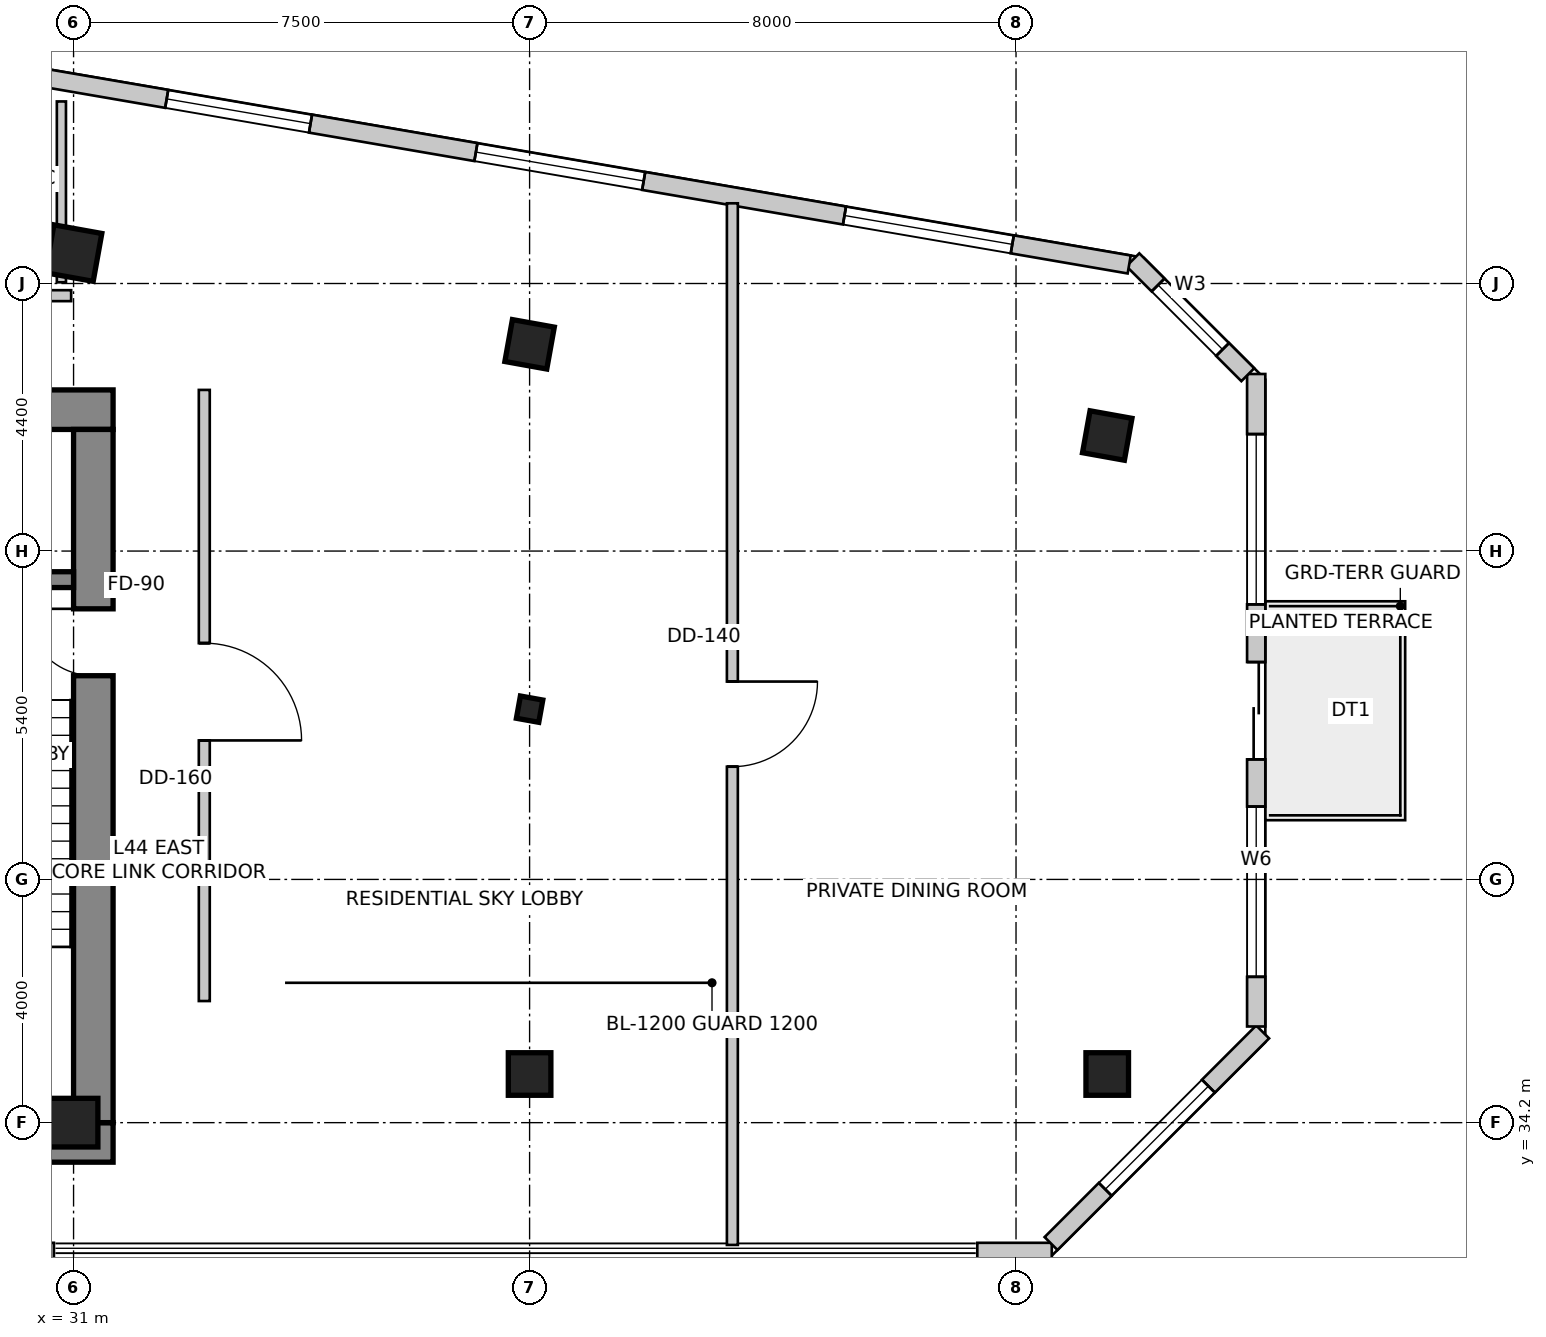
"""IFC4 building model, lengths in metres.
Left out: names, types, materials, properties, quantities, classifications, styles, units other than length and angle.
Written with IfcOpenShell. Run it as: python <this file> out.ifc"""

import sys

from ifc_helpers import new_model, si_unit, direction, frame, frame_2d, origin, origin_2d, place, context, subcontext, project, spatial, rectangle, i_section, extrude, source, transform, mapped, element, fill, save


model = new_model("IFC4")
c1 = context("Model", 3, precision=1e-05, world=origin(), true_north=direction((0.0, 1.0)))
c2 = subcontext(c1, "Body", "Model", "MODEL_VIEW")
j1 = project(units=[si_unit("LENGTHUNIT", "METRE"), si_unit("PLANEANGLEUNIT", "RADIAN")], contexts=[c1])
p1 = place(None, origin())
s1 = spatial("IfcSite", under=j1, at=p1, CompositionType="ELEMENT")
p2 = place(p1, origin())
s2 = spatial("IfcBuilding", under=s1, at=p2, CompositionType="ELEMENT")
p3 = place(p2, frame((0.0, 0.0, 178.2)))
s3 = spatial("IfcBuildingStorey", under=s2, at=p3, CompositionType="ELEMENT", Elevation=178.2)
p4 = place(p3, frame((15.95, 45.925, 0.0), z_axis=(0.0, 0.0, 1.0), x_axis=(1.0, 0.0, 0.0)))
e1 = element("IfcWall", 1, at=p4, inside=s3, PredefinedType="SHEAR", context=c2, shape_type="SweptSolid", body=[
    extrude(rectangle(XDim=15.7, YDim=0.65, at=frame_2d((7.85, 0.0))), origin(), (0.0, 0.0, 1.0), 5.2),
])
p5 = place(p3, frame((15.95, 33.875, 0.0), z_axis=(0.0, 0.0, 1.0), x_axis=(1.0, 0.0, 0.0)))
e2 = element("IfcWall", 2, at=p5, inside=s3, PredefinedType="SHEAR", context=c2, shape_type="SweptSolid", body=[
    extrude(rectangle(XDim=15.7, YDim=0.65, at=frame_2d((7.85, 0.0))), origin(), (0.0, 0.0, 1.0), 5.2),
])
m1 = source(origin(), c2, "Body", "SweptSolid", [
    extrude(rectangle(XDim=1.1, YDim=2.15, at=frame_2d((0.55, 1.075))), frame((0.0, 0.335, 0.0), z_axis=(0.0, -1.0, 0.0), x_axis=(1.0, 0.0, 0.0)), (0.0, 0.0, 1.0), 0.67),
])
p6 = place(p5, frame((10.08, 0.0, 0.0)))
e3 = element("IfcOpeningElement", 3, at=p6, cuts=e2, PredefinedType="OPENING", context=c2, shape_type="MappedRepresentation", body=[
    mapped(m1, transform((0.0, 0.0, 0.0), scale=1.0)),
])
p7 = place(p3, frame((31.325, 34.2, 0.0), z_axis=(0.0, 0.0, 1.0), x_axis=(0.0, 1.0, 0.0)))
e4 = element("IfcWall", 4, at=p7, inside=s3, PredefinedType="SHEAR", context=c2, shape_type="SweptSolid", body=[
    extrude(rectangle(XDim=11.4, YDim=0.65, at=frame_2d((5.7, 0.0))), origin(), (0.0, 0.0, 1.0), 5.2),
])
p8 = place(p7, frame((7.35, 0.0, 0.0)))
e5 = element("IfcOpeningElement", 5, at=p8, cuts=e4, PredefinedType="OPENING", context=c2, shape_type="MappedRepresentation", body=[
    mapped(m1, transform((0.0, 0.0, 0.0), scale=1.0)),
])
p9 = place(p3, frame((27.5, 43.13, 0.0), z_axis=(0.0, 0.0, 1.0), x_axis=(1.0, 0.0, 0.0)))
e6 = element("IfcWall", 6, at=p9, inside=s3, PredefinedType="SHEAR", context=c2, shape_type="SweptSolid", body=[
    extrude(rectangle(XDim=3.5, YDim=0.26, at=frame_2d((1.75, 0.0))), origin(), (0.0, 0.0, 1.0), 5.2),
])
m2 = source(origin(), c2, "Body", "SweptSolid", [
    extrude(rectangle(XDim=0.8, YDim=0.8, at=origin_2d()), origin(), (0.0, 0.0, 1.0), 5.2),
])
p10 = place(p3, frame((31.0, 48.5, 0.0), z_axis=(0.0, 0.0, 1.0), x_axis=(0.984195607969, -0.17708474032, 0.0)))
e7 = element("IfcColumn", 7, at=p10, inside=s3, PredefinedType="COLUMN", context=c2, shape_type="MappedRepresentation", body=[
    mapped(m2, transform((0.0, 0.0, 0.0), scale=1.0)),
])
m3 = source(origin(), c2, "Body", "SweptSolid", [
    extrude(rectangle(XDim=0.7, YDim=0.7, at=origin_2d()), origin(), (0.0, 0.0, 1.0), 5.2),
])
for number, where, z_axis, x_axis in (
    (8, (38.5, 47.0, 0.0), (0.0, 0.0, 1.0), (0.984, -0.177, 0.0)),
    (9, (48.0, 45.5, 0.0), (0.0, 0.0, 1.0), (0.984, -0.177, 0.0)),
):
    element("IfcColumn", number, at=place(p3, frame(where, z_axis=z_axis, x_axis=x_axis)), inside=s3, PredefinedType="COLUMN", context=c2, shape_type="MappedRepresentation", body=[
        mapped(m3, transform((0.0, 0.0, 0.0), scale=1.0)),
    ])
p11 = place(p3, frame((31.0, 34.2, 0.0), z_axis=(0.0, 0.0, 1.0), x_axis=(1.0, 0.0, 0.0)))
e10 = element("IfcColumn", 10, at=p11, inside=s3, PredefinedType="COLUMN", context=c2, shape_type="MappedRepresentation", body=[
    mapped(m2, transform((0.0, 0.0, 0.0), scale=1.0)),
])
for number, where, z_axis, x_axis in (
    (11, (38.5, 35.0, 0.0), (0.0, 0.0, 1.0), (1.0, 0.0, 0.0)),
    (12, (48.0, 35.0, 0.0), (0.0, 0.0, 1.0), (1.0, 0.0, 0.0)),
):
    element("IfcColumn", number, at=place(p3, frame(where, z_axis=z_axis, x_axis=x_axis)), inside=s3, PredefinedType="COLUMN", context=c2, shape_type="MappedRepresentation", body=[
        mapped(m3, transform((0.0, 0.0, 0.0), scale=1.0)),
    ])
m4 = source(origin(), c2, "Body", "SweptSolid", [
    extrude(i_section(OverallWidth=0.374, OverallDepth=0.372, WebThickness=0.016, FlangeThickness=0.026, FilletRadius=0.015, at=origin_2d()), origin(), (0.0, 0.0, 1.0), 5.2),
])
p12 = place(p3, frame((38.5, 41.0, 0.0), z_axis=(0.0, 0.0, 1.0), x_axis=(0.984195607969, -0.17708474032, 0.0)))
e13 = element("IfcColumn", 13, at=p12, inside=s3, PredefinedType="COLUMN", context=c2, shape_type="MappedRepresentation", body=[
    mapped(m4, transform((0.0, 0.0, 0.0), scale=1.0)),
])
p13 = place(p3, frame((29.797, 32.074, 0.0), z_axis=(0.0, 0.0, 1.0), x_axis=(1.0, 0.0, 0.0)))
e14 = element("IfcWall", 14, at=p13, inside=s3, PredefinedType="SOLIDWALL", context=c2, shape_type="SweptSolid", body=[
    extrude(rectangle(XDim=0.88, YDim=0.3, at=frame_2d((0.44, 0.0))), origin(), (0.0, 0.0, 1.0), 4.95),
])
p14 = place(p3, frame((45.863, 32.074, 0.0), z_axis=(0.0, 0.0, 1.0), x_axis=(1.0, 0.0, 0.0)))
e15 = element("IfcWall", 15, at=p14, inside=s3, PredefinedType="SOLIDWALL", context=c2, shape_type="SweptSolid", body=[
    extrude(rectangle(XDim=1.225, YDim=0.3, at=frame_2d((0.613, 0.0))), origin(), (0.0, 0.0, 1.0), 4.95),
])
p15 = place(p3, frame((47.076, 32.212, 0.0), z_axis=(0.0, 0.0, 1.0), x_axis=(0.707106781187, 0.707106781187, 0.0)))
e16 = element("IfcWall", 16, at=p15, inside=s3, PredefinedType="SOLIDWALL", context=c2, shape_type="SweptSolid", body=[
    extrude(rectangle(XDim=4.922, YDim=0.3, at=frame_2d((2.461, 0.0))), origin(), (0.0, 0.0, 1.0), 4.95),
])
m5 = source(origin(), c2, "Body", "SweptSolid", [
    extrude(rectangle(XDim=2.4, YDim=2.2, at=frame_2d((1.2, 1.1))), frame((0.0, 0.16, 0.0), z_axis=(0.0, -1.0, 0.0), x_axis=(1.0, 0.0, 0.0)), (0.0, 0.0, 1.0), 0.32),
])
p16 = place(p15, frame((1.261, 0.0, 0.85)))
e17 = element("IfcOpeningElement", 17, at=p16, cuts=e16, PredefinedType="OPENING", context=c2, shape_type="MappedRepresentation", body=[
    mapped(m5, transform((0.0, 0.0, 0.0), scale=1.0)),
])
p17 = place(p3, frame((50.45, 35.781, 0.0), z_axis=(0.0, 0.0, 1.0), x_axis=(0.0, 1.0, 0.0)))
e18 = element("IfcWall", 18, at=p17, inside=s3, PredefinedType="SOLIDWALL", context=c2, shape_type="SweptSolid", body=[
    extrude(rectangle(XDim=10.731, YDim=0.3, at=frame_2d((5.365, 0.0))), origin(), (0.0, 0.0, 1.0), 4.95),
])
m6 = source(origin(), c2, "Body", "SweptSolid", [
    extrude(rectangle(XDim=1.6, YDim=2.15, at=frame_2d((0.8, 1.075))), frame((0.0, 0.16, 0.0), z_axis=(0.0, -1.0, 0.0), x_axis=(1.0, 0.0, 0.0)), (0.0, 0.0, 1.0), 0.32),
])
p18 = place(p17, frame((4.393, 0.0, 0.0)))
e19 = element("IfcOpeningElement", 19, at=p18, cuts=e18, PredefinedType="OPENING", context=c2, shape_type="MappedRepresentation", body=[
    mapped(m6, transform((0.0, 0.0, 0.0), scale=1.0)),
])
m7 = source(origin(), c2, "Body", "SweptSolid", [
    extrude(rectangle(XDim=2.8, YDim=2.4, at=frame_2d((1.4, 1.2))), frame((0.0, 0.16, 0.0), z_axis=(0.0, -1.0, 0.0), x_axis=(1.0, 0.0, 0.0)), (0.0, 0.0, 1.0), 0.32),
])
p19 = place(p17, frame((0.817, 0.0, 0.85)))
e20 = element("IfcOpeningElement", 20, at=p19, cuts=e18, PredefinedType="OPENING", context=c2, shape_type="MappedRepresentation", body=[
    mapped(m7, transform((0.0, 0.0, 0.0), scale=1.0)),
])
p20 = place(p17, frame((6.942, 0.0, 0.85)))
e21 = element("IfcOpeningElement", 21, at=p20, cuts=e18, PredefinedType="OPENING", context=c2, shape_type="MappedRepresentation", body=[
    mapped(m7, transform((0.0, 0.0, 0.0), scale=1.0)),
])
p21 = place(p3, frame((50.312, 46.5, 0.0), z_axis=(0.0, 0.0, 1.0), x_axis=(-0.707106781187, 0.707106781187, 0.0)))
e22 = element("IfcWall", 22, at=p21, inside=s3, PredefinedType="SOLIDWALL", context=c2, shape_type="SweptSolid", body=[
    extrude(rectangle(XDim=2.673, YDim=0.3, at=frame_2d((1.337, 0.0))), origin(), (0.0, 0.0, 1.0), 4.95),
])
m8 = source(origin(), c2, "Body", "SweptSolid", [
    extrude(rectangle(XDim=1.5, YDim=1.8, at=frame_2d((0.75, 0.9))), frame((0.0, 0.16, 0.0), z_axis=(0.0, -1.0, 0.0), x_axis=(1.0, 0.0, 0.0)), (0.0, 0.0, 1.0), 0.32),
])
p22 = place(p21, frame((0.587, 0.0, 0.85)))
e23 = element("IfcOpeningElement", 23, at=p22, cuts=e22, PredefinedType="OPENING", context=c2, shape_type="MappedRepresentation", body=[
    mapped(m8, transform((0.0, 0.0, 0.0), scale=1.0)),
])
p23 = place(p3, frame((48.361, 48.313, 0.0), z_axis=(0.0, 0.0, 1.0), x_axis=(-0.985523113069, 0.169541126597, 0.0)))
e24 = element("IfcWall", 24, at=p23, inside=s3, PredefinedType="SOLIDWALL", context=c2, shape_type="SweptSolid", body=[
    extrude(rectangle(XDim=26.866, YDim=0.3, at=frame_2d((13.433, 0.0))), origin(), (0.0, 0.0, 1.0), 4.95),
])
p24 = place(p23, frame((1.951, 0.0, 0.85)))
e25 = element("IfcOpeningElement", 25, at=p24, cuts=e24, PredefinedType="OPENING", context=c2, shape_type="MappedRepresentation", body=[
    mapped(m7, transform((0.0, 0.0, 0.0), scale=1.0)),
])
p25 = place(p23, frame((8.102, 0.0, 0.85)))
e26 = element("IfcOpeningElement", 26, at=p25, cuts=e24, PredefinedType="OPENING", context=c2, shape_type="MappedRepresentation", body=[
    mapped(m7, transform((0.0, 0.0, 0.0), scale=1.0)),
])
p26 = place(p23, frame((13.662, 0.0, 0.85)))
e27 = element("IfcOpeningElement", 27, at=p26, cuts=e24, PredefinedType="OPENING", context=c2, shape_type="MappedRepresentation", body=[
    mapped(m5, transform((0.0, 0.0, 0.0), scale=1.0)),
])
p27 = place(p23, frame((19.83, 0.0, 0.85)))
e28 = element("IfcOpeningElement", 28, at=p27, cuts=e24, PredefinedType="OPENING", context=c2, shape_type="MappedRepresentation", body=[
    mapped(m7, transform((0.0, 0.0, 0.0), scale=1.0)),
])
p28 = place(p23, frame((24.983, 0.0, 0.85)))
e29 = element("IfcOpeningElement", 29, at=p28, cuts=e24, PredefinedType="OPENING", context=c2, shape_type="MappedRepresentation", body=[
    mapped(m8, transform((0.0, 0.0, 0.0), scale=1.0)),
])
p29 = place(p3, frame((24.162, 47.8, 0.0), z_axis=(0.0, 0.0, 1.0), x_axis=(1.0, 0.0, 0.0)))
e30 = element("IfcWall", 30, at=p29, inside=s3, PredefinedType="PARTITIONING", context=c2, shape_type="SweptSolid", body=[
    extrude(rectangle(XDim=6.798, YDim=0.18, at=frame_2d((3.399, 0.0))), origin(), (0.0, 0.0, 1.0), 4.522),
])
m9 = source(origin(), c2, "Body", "SweptSolid", [
    extrude(rectangle(XDim=0.85, YDim=2.15, at=frame_2d((0.425, 1.075))), frame((0.0, 0.1, 0.0), z_axis=(0.0, -1.0, 0.0), x_axis=(1.0, 0.0, 0.0)), (0.0, 0.0, 1.0), 0.2),
])
p30 = place(p29, frame((2.974, 0.0, 0.0)))
e31 = element("IfcOpeningElement", 31, at=p30, cuts=e30, PredefinedType="OPENING", context=c2, shape_type="MappedRepresentation", body=[
    mapped(m9, transform((0.0, 0.0, 0.0), scale=1.0)),
])
p31 = place(p3, frame((33.15, 46.25, 0.0), z_axis=(0.0, 0.0, 1.0), x_axis=(0.0, -1.0, 0.0)))
e32 = element("IfcWall", 32, at=p31, inside=s3, PredefinedType="PARTITIONING", context=c2, shape_type="SweptSolid", body=[
    extrude(rectangle(XDim=10.05, YDim=0.18, at=frame_2d((5.025, 0.0))), origin(), (0.0, 0.0, 1.0), 4.522),
])
m10 = source(origin(), c2, "Body", "SweptSolid", [
    extrude(rectangle(XDim=1.6, YDim=2.15, at=frame_2d((0.8, 1.075))), frame((0.0, 0.1, 0.0), z_axis=(0.0, -1.0, 0.0), x_axis=(1.0, 0.0, 0.0)), (0.0, 0.0, 1.0), 0.2),
])
p32 = place(p31, frame((4.164, 0.0, 0.0)))
e33 = element("IfcOpeningElement", 33, at=p32, cuts=e32, PredefinedType="OPENING", context=c2, shape_type="MappedRepresentation", body=[
    mapped(m10, transform((0.0, 0.0, 0.0), scale=1.0)),
])
p33 = place(p3, frame((41.835, 49.319, 0.0), z_axis=(0.0, 0.0, 1.0), x_axis=(0.0, -1.0, 0.0)))
e34 = element("IfcWall", 34, at=p33, inside=s3, PredefinedType="PARTITIONING", context=c2, shape_type="SweptSolid", body=[
    extrude(rectangle(XDim=17.13, YDim=0.18, at=frame_2d((8.565, 0.0))), origin(), (0.0, 0.0, 1.0), 4.242),
])
m11 = source(origin(), c2, "Body", "SweptSolid", [
    extrude(rectangle(XDim=1.4, YDim=2.15, at=frame_2d((0.7, 1.075))), frame((0.0, 0.1, 0.0), z_axis=(0.0, -1.0, 0.0), x_axis=(1.0, 0.0, 0.0)), (0.0, 0.0, 1.0), 0.2),
])
p34 = place(p33, frame((7.865, 0.0, 0.0)))
e35 = element("IfcOpeningElement", 35, at=p34, cuts=e34, PredefinedType="OPENING", context=c2, shape_type="MappedRepresentation", body=[
    mapped(m11, transform((0.0, 0.0, 0.0), scale=1.0)),
])
p35 = place(p3, frame((30.8, 50.994, 0.0), z_axis=(0.0, 0.0, 1.0), x_axis=(0.0, -1.0, 0.0)))
e36 = element("IfcWall", 36, at=p35, inside=s3, PredefinedType="PARTITIONING", context=c2, shape_type="SweptSolid", body=[
    extrude(rectangle(XDim=2.974, YDim=0.15, at=frame_2d((1.487, 0.0))), origin(), (0.0, 0.0, 1.0), 4.242),
])
m12 = source(origin(), c2, "Body", "SweptSolid", [
    extrude(rectangle(XDim=2.4, YDim=2.2, at=frame_2d((1.2, 1.1))), frame((0.0, -0.015, 0.0), z_axis=(0.0, -1.0, 0.0), x_axis=(1.0, 0.0, 0.0)), (0.0, 0.0, 1.0), 0.06),
])
p36 = place(p16, origin())
e37 = element("IfcWindow", 37, at=p36, inside=s3, PartitioningType="SINGLE_PANEL", PredefinedType="WINDOW", context=c2, shape_type="MappedRepresentation", body=[
    mapped(m12, transform((0.0, 0.0, 0.0), scale=1.0)),
])
fill(e17, e37)
m13 = source(origin(), c2, "Body", "SweptSolid", [
    extrude(rectangle(XDim=1.6, YDim=2.15, at=frame_2d((0.8, 1.075))), frame((0.0, 0.025, 0.0), z_axis=(0.0, -1.0, 0.0), x_axis=(1.0, 0.0, 0.0)), (0.0, 0.0, 1.0), 0.05),
])
p37 = place(p18, origin())
e38 = element("IfcDoor", 38, at=p37, inside=s3, OperationType="DOUBLE_DOOR_SLIDING", PredefinedType="DOOR", context=c2, shape_type="MappedRepresentation", body=[
    mapped(m13, transform((0.0, 0.0, 0.0), scale=1.0)),
])
fill(e19, e38)
m14 = source(origin(), c2, "Body", "SweptSolid", [
    extrude(rectangle(XDim=2.8, YDim=2.4, at=frame_2d((1.4, 1.2))), frame((0.0, -0.015, 0.0), z_axis=(0.0, -1.0, 0.0), x_axis=(1.0, 0.0, 0.0)), (0.0, 0.0, 1.0), 0.06),
])
p38 = place(p19, origin())
e39 = element("IfcWindow", 39, at=p38, inside=s3, PartitioningType="SINGLE_PANEL", PredefinedType="WINDOW", context=c2, shape_type="MappedRepresentation", body=[
    mapped(m14, transform((0.0, 0.0, 0.0), scale=1.0)),
])
fill(e20, e39)
p39 = place(p20, origin())
e40 = element("IfcWindow", 40, at=p39, inside=s3, PartitioningType="SINGLE_PANEL", PredefinedType="WINDOW", context=c2, shape_type="MappedRepresentation", body=[
    mapped(m14, transform((0.0, 0.0, 0.0), scale=1.0)),
])
fill(e21, e40)
m15 = source(origin(), c2, "Body", "SweptSolid", [
    extrude(rectangle(XDim=1.5, YDim=1.8, at=frame_2d((0.75, 0.9))), frame((0.0, -0.015, 0.0), z_axis=(0.0, -1.0, 0.0), x_axis=(1.0, 0.0, 0.0)), (0.0, 0.0, 1.0), 0.06),
])
p40 = place(p22, origin())
e41 = element("IfcWindow", 41, at=p40, inside=s3, PartitioningType="SINGLE_PANEL", PredefinedType="WINDOW", context=c2, shape_type="MappedRepresentation", body=[
    mapped(m15, transform((0.0, 0.0, 0.0), scale=1.0)),
])
fill(e23, e41)
p41 = place(p24, origin())
e42 = element("IfcWindow", 42, at=p41, inside=s3, PartitioningType="SINGLE_PANEL", PredefinedType="WINDOW", context=c2, shape_type="MappedRepresentation", body=[
    mapped(m14, transform((0.0, 0.0, 0.0), scale=1.0)),
])
fill(e25, e42)
p42 = place(p25, origin())
e43 = element("IfcWindow", 43, at=p42, inside=s3, PartitioningType="SINGLE_PANEL", PredefinedType="WINDOW", context=c2, shape_type="MappedRepresentation", body=[
    mapped(m14, transform((0.0, 0.0, 0.0), scale=1.0)),
])
fill(e26, e43)
p43 = place(p26, origin())
e44 = element("IfcWindow", 44, at=p43, inside=s3, PartitioningType="SINGLE_PANEL", PredefinedType="WINDOW", context=c2, shape_type="MappedRepresentation", body=[
    mapped(m12, transform((0.0, 0.0, 0.0), scale=1.0)),
])
fill(e27, e44)
m16 = source(origin(), c2, "Body", "SweptSolid", [
    extrude(rectangle(XDim=1.1, YDim=2.15, at=frame_2d((0.55, 1.075))), frame((0.0, 0.025, 0.0), z_axis=(0.0, -1.0, 0.0), x_axis=(1.0, 0.0, 0.0)), (0.0, 0.0, 1.0), 0.05),
])
p44 = place(p8, origin())
e45 = element("IfcDoor", 45, at=p44, inside=s3, OperationType="SINGLE_SWING_RIGHT", PredefinedType="DOOR", context=c2, shape_type="MappedRepresentation", body=[
    mapped(m16, transform((0.0, 0.0, 0.0), scale=1.0)),
])
fill(e5, e45)
m17 = source(origin(), c2, "Body", "SweptSolid", [
    extrude(rectangle(XDim=1.6, YDim=2.15, at=frame_2d((0.8, 1.075))), frame((0.0, 0.025, 0.0), z_axis=(0.0, -1.0, 0.0), x_axis=(1.0, 0.0, 0.0)), (0.0, 0.0, 1.0), 0.05),
])
p45 = place(p32, origin())
e46 = element("IfcDoor", 46, at=p45, inside=s3, OperationType="SINGLE_SWING_RIGHT", PredefinedType="DOOR", context=c2, shape_type="MappedRepresentation", body=[
    mapped(m17, transform((0.0, 0.0, 0.0), scale=1.0)),
])
fill(e33, e46)
m18 = source(origin(), c2, "Body", "SweptSolid", [
    extrude(rectangle(XDim=1.4, YDim=2.15, at=frame_2d((0.7, 1.075))), frame((0.0, 0.025, 0.0), z_axis=(0.0, -1.0, 0.0), x_axis=(1.0, 0.0, 0.0)), (0.0, 0.0, 1.0), 0.05),
])
p46 = place(p34, origin())
e47 = element("IfcDoor", 47, at=p46, inside=s3, OperationType="SINGLE_SWING_LEFT", PredefinedType="DOOR", context=c2, shape_type="MappedRepresentation", body=[
    mapped(m18, transform((0.0, 0.0, 0.0), scale=1.0)),
])
fill(e35, e47)
save(model, sys.argv[1])
